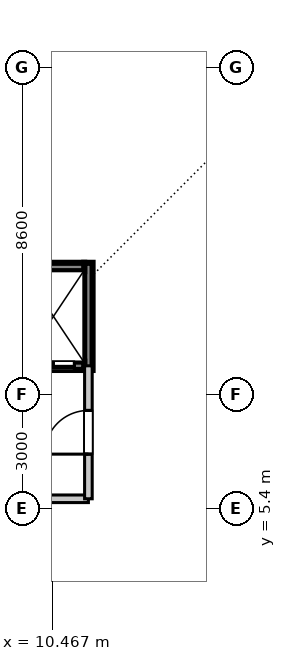
"""IFC4 building model, lengths in metres.
Left out: names, types, materials, properties, quantities, classifications, styles, units other than length and angle.
Written with IfcOpenShell. Run it as: python <this file> out.ifc"""

import sys

from ifc_helpers import new_model, si_unit, direction, frame, frame_2d, origin, place, context, subcontext, project, spatial, rectangle, extrude, source, transform, mapped, element, fill, save


model = new_model("IFC4")
c1 = context("Model", 3, precision=1e-05, world=origin(), true_north=direction((0.0, 1.0)))
c2 = subcontext(c1, "Body", "Model", "MODEL_VIEW")
j1 = project(units=[si_unit("LENGTHUNIT", "METRE"), si_unit("PLANEANGLEUNIT", "RADIAN")], contexts=[c1])
p1 = place(None, origin())
s1 = spatial("IfcSite", under=j1, at=p1, CompositionType="ELEMENT")
p2 = place(p1, origin())
s2 = spatial("IfcBuilding", under=s1, at=p2, CompositionType="ELEMENT")
p3 = place(p2, frame((0.0, 0.0, 357.05)))
s3 = spatial("IfcBuildingStorey", under=s2, at=p3, CompositionType="ELEMENT", Elevation=357.05)
m1 = source(origin(), c2, "Body", "SweptSolid", [
    extrude(rectangle(XDim=2.82, YDim=0.22, at=frame_2d((1.41, 0.0))), origin(), (0.0, 0.0, 1.0), 4.3),
])
p4 = place(p3, frame((11.42, 9.04, 0.0), z_axis=(0.0, 0.0, 1.0), x_axis=(0.0, 1.0, 0.0)))
e1 = element("IfcWall", 1, at=p4, inside=s3, PredefinedType="SHEAR", context=c2, shape_type="MappedRepresentation", body=[
    mapped(m1, transform((0.0, 0.0, 0.0), scale=1.0)),
])
m2 = source(origin(), c2, "Body", "SweptSolid", [
    extrude(rectangle(XDim=1.62, YDim=0.22, at=frame_2d((0.81, 0.0))), origin(), (0.0, 0.0, 1.0), 4.3),
])
p5 = place(p3, frame((9.69, 9.15, 0.0), z_axis=(0.0, 0.0, 1.0), x_axis=(1.0, 0.0, 0.0)))
e2 = element("IfcWall", 2, at=p5, inside=s3, PredefinedType="SHEAR", context=c2, shape_type="MappedRepresentation", body=[
    mapped(m2, transform((0.0, 0.0, 0.0), scale=1.0)),
])
p6 = place(p5, frame((0.26, 0.0, 0.0)))
e3 = element("IfcOpeningElement", 3, at=p6, cuts=e2, PredefinedType="OPENING", context=c2, shape_type="SweptSolid", body=[
    extrude(rectangle(XDim=1.1, YDim=2.2, at=frame_2d((0.55, 1.1))), frame((0.0, 0.12, 0.0), z_axis=(0.0, -1.0, 0.0), x_axis=(1.0, 0.0, 0.0)), (0.0, 0.0, 1.0), 0.24),
])
p7 = place(p3, frame((9.69, 11.75, 0.0), z_axis=(0.0, 0.0, 1.0), x_axis=(1.0, 0.0, 0.0)))
e4 = element("IfcWall", 4, at=p7, inside=s3, PredefinedType="SHEAR", context=c2, shape_type="MappedRepresentation", body=[
    mapped(m2, transform((0.0, 0.0, 0.0), scale=1.0)),
])
m3 = source(origin(), c2, "Body", "SweptSolid", [
    extrude(rectangle(XDim=3.82, YDim=0.2, at=frame_2d((1.91, 0.0))), origin(), (0.0, 0.0, 1.0), 3.4),
])
p8 = place(p3, frame((7.6, 5.65, 0.0), z_axis=(0.0, 0.0, 1.0), x_axis=(1.0, 0.0, 0.0)))
e5 = element("IfcWall", 5, at=p8, inside=s3, PredefinedType="PARTITIONING", context=c2, shape_type="MappedRepresentation", body=[
    mapped(m3, transform((0.0, 0.0, 0.0), scale=1.0)),
])
m4 = source(origin(), c2, "Body", "SweptSolid", [
    extrude(rectangle(XDim=3.5, YDim=0.2, at=frame_2d((1.75, 0.0))), origin(), (0.0, 0.0, 1.0), 3.4),
])
p9 = place(p3, frame((11.42, 5.65, 0.0), z_axis=(0.0, 0.0, 1.0), x_axis=(0.0, 1.0, 0.0)))
e6 = element("IfcWall", 6, at=p9, inside=s3, PredefinedType="PARTITIONING", context=c2, shape_type="MappedRepresentation", body=[
    mapped(m4, transform((0.0, 0.0, 0.0), scale=1.0)),
])
p10 = place(p9, frame((1.175, 0.0, 0.0)))
e7 = element("IfcOpeningElement", 7, at=p10, cuts=e6, PredefinedType="OPENING", context=c2, shape_type="SweptSolid", body=[
    extrude(rectangle(XDim=1.15, YDim=2.15, at=frame_2d((0.575, 1.075))), frame((0.0, 0.11, 0.0), z_axis=(0.0, -1.0, 0.0), x_axis=(1.0, 0.0, 0.0)), (0.0, 0.0, 1.0), 0.22),
])
m5 = source(origin(), c2, "Body", "SweptSolid", [
    extrude(rectangle(XDim=1.1, YDim=2.2, at=frame_2d((0.55, 1.1))), frame((0.0, 0.025, 0.0), z_axis=(0.0, -1.0, 0.0), x_axis=(1.0, 0.0, 0.0)), (0.0, 0.0, 1.0), 0.05),
])
p11 = place(p6, frame((1.1, 0.0, 0.0), z_axis=(0.0, 0.0, 1.0), x_axis=(-1.0, 0.0, 0.0)))
e8 = element("IfcDoor", 8, at=p11, inside=s3, OperationType="DOUBLE_DOOR_SLIDING", PredefinedType="DOOR", context=c2, shape_type="MappedRepresentation", body=[
    mapped(m5, transform((0.0, 0.0, 0.0), scale=1.0)),
])
fill(e3, e8)
m6 = source(origin(), c2, "Body", "SweptSolid", [
    extrude(rectangle(XDim=1.15, YDim=2.15, at=frame_2d((0.575, 1.075))), frame((0.0, 0.025, 0.0), z_axis=(0.0, -1.0, 0.0), x_axis=(1.0, 0.0, 0.0)), (0.0, 0.0, 1.0), 0.05),
])
p12 = place(p10, frame((1.15, 0.0, 0.0), z_axis=(0.0, 0.0, 1.0), x_axis=(-1.0, 0.0, 0.0)))
e9 = element("IfcDoor", 9, at=p12, inside=s3, OperationType="SINGLE_SWING_LEFT", PredefinedType="DOOR", context=c2, shape_type="MappedRepresentation", body=[
    mapped(m6, transform((0.0, 0.0, 0.0), scale=1.0)),
])
fill(e7, e9)
save(model, sys.argv[1])
